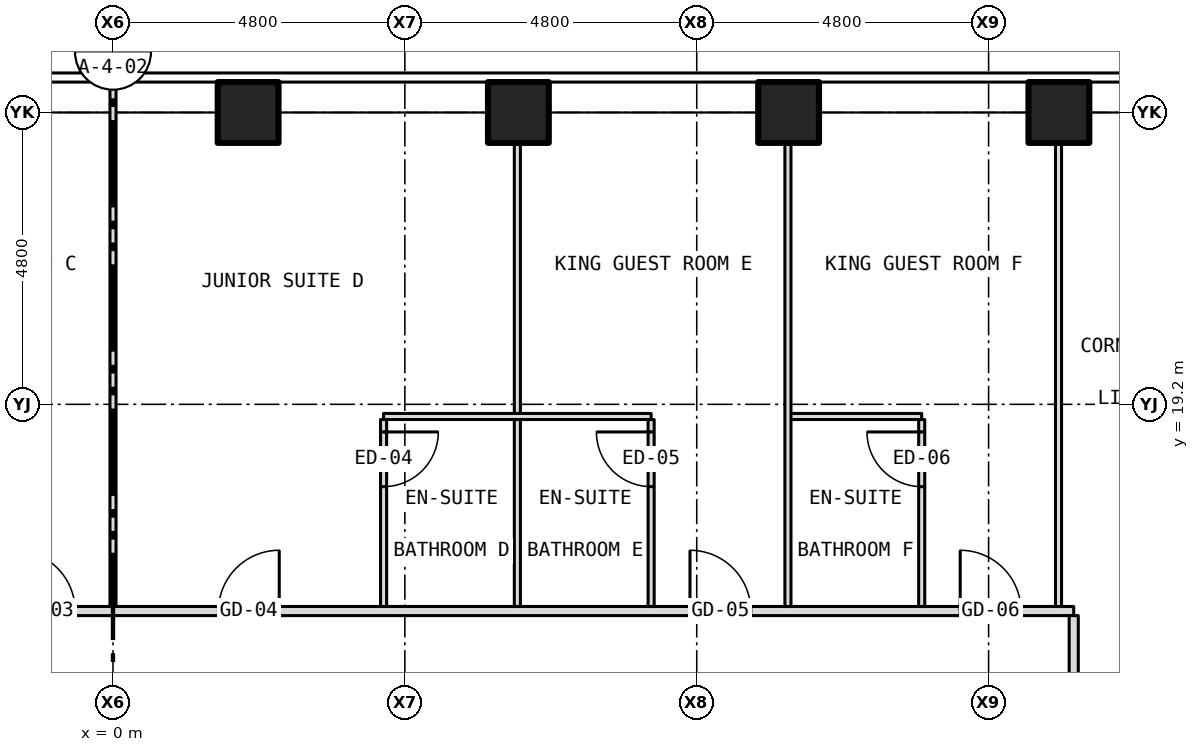
"""IFC4 building model, lengths in metres.
Left out: names, types, materials, properties, quantities, classifications, styles, units other than length and angle.
Written with IfcOpenShell. Run it as: python <this file> out.ifc"""

import sys

from ifc_helpers import new_model, si_unit, direction, frame, frame_2d, origin, origin_2d, place, context, subcontext, project, spatial, rectangle, hollow_rectangle, extrude, element, fill, save


model = new_model("IFC4")
c1 = context("Model", 3, precision=1e-05, world=origin(), true_north=direction((0.0, 1.0)))
c2 = subcontext(c1, "Body", "Model", "MODEL_VIEW")
j1 = project(units=[si_unit("LENGTHUNIT", "METRE"), si_unit("PLANEANGLEUNIT", "RADIAN")], contexts=[c1])
p1 = place(None, origin())
s1 = spatial("IfcSite", under=j1, at=p1, CompositionType="ELEMENT")
p2 = place(p1, origin())
s2 = spatial("IfcBuilding", under=s1, at=p2, CompositionType="ELEMENT")
p3 = place(p2, frame((0.0, 0.0, 56.5)))
s3 = spatial("IfcBuildingStorey", under=s2, at=p3, CompositionType="ELEMENT", Elevation=56.5)
for number, where, z_axis, x_axis in (
    (1, (2.222, 24.0, -0.15), (0.0, 0.0, 1.0), (1.0, 0.0, 0.0)),
    (2, (6.667, 24.0, -0.15), (0.0, 0.0, 1.0), (1.0, 0.0, 0.0)),
    (3, (11.111, 24.0, -0.15), (0.0, 0.0, 1.0), (1.0, 0.0, 0.0)),
    (4, (15.556, 24.0, -0.15), (0.0, 0.0, 1.0), (1.0, 0.0, 0.0)),
):
    element("IfcColumn", number, at=place(p3, frame(where, z_axis=z_axis, x_axis=x_axis)), inside=s3, PredefinedType="COLUMN", context=c2, shape_type="SweptSolid", body=[
        extrude(hollow_rectangle(XDim=1.0, YDim=1.0, WallThickness=0.06, at=origin_2d()), origin(), (0.0, 0.0, 1.0), 3.5),
    ])
p4 = place(p3, frame((-15.8, 15.8, 0.0), z_axis=(0.0, 0.0, 1.0), x_axis=(1.0, 0.0, 0.0)))
e5 = element("IfcWall", 5, at=p4, inside=s3, PredefinedType="PARTITIONING", context=c2, shape_type="SweptSolid", body=[
    extrude(rectangle(XDim=31.6, YDim=0.15, at=frame_2d((15.8, 0.0))), origin(), (0.0, 0.0, 1.0), 3.35),
])
p5 = place(p4, frame((4.178, 0.0, 0.0)))
e6 = element("IfcOpeningElement", 6, at=p5, cuts=e5, PredefinedType="OPENING", context=c2, shape_type="SweptSolid", body=[
    extrude(rectangle(XDim=1.0, YDim=2.1, at=frame_2d((0.5, 1.05))), frame((0.0, 0.087, 0.0), z_axis=(0.0, -1.0, 0.0), x_axis=(1.0, 0.0, 0.0)), (0.0, 0.0, 1.0), 0.174),
])
p6 = place(p4, frame((9.734, 0.0, 0.0)))
e7 = element("IfcOpeningElement", 7, at=p6, cuts=e5, PredefinedType="OPENING", context=c2, shape_type="SweptSolid", body=[
    extrude(rectangle(XDim=1.0, YDim=2.1, at=frame_2d((0.5, 1.05))), frame((0.0, 0.087, 0.0), z_axis=(0.0, -1.0, 0.0), x_axis=(1.0, 0.0, 0.0)), (0.0, 0.0, 1.0), 0.174),
])
p7 = place(p4, frame((14.178, 0.0, 0.0)))
e8 = element("IfcOpeningElement", 8, at=p7, cuts=e5, PredefinedType="OPENING", context=c2, shape_type="SweptSolid", body=[
    extrude(rectangle(XDim=1.0, YDim=2.1, at=frame_2d((0.5, 1.05))), frame((0.0, 0.087, 0.0), z_axis=(0.0, -1.0, 0.0), x_axis=(1.0, 0.0, 0.0)), (0.0, 0.0, 1.0), 0.174),
])
p8 = place(p4, frame((17.534, 0.0, 0.0)))
e9 = element("IfcOpeningElement", 9, at=p8, cuts=e5, PredefinedType="OPENING", context=c2, shape_type="SweptSolid", body=[
    extrude(rectangle(XDim=1.0, YDim=2.1, at=frame_2d((0.5, 1.05))), frame((0.0, 0.087, 0.0), z_axis=(0.0, -1.0, 0.0), x_axis=(1.0, 0.0, 0.0)), (0.0, 0.0, 1.0), 0.174),
])
p9 = place(p4, frame((25.289, 0.0, 0.0)))
e10 = element("IfcOpeningElement", 10, at=p9, cuts=e5, PredefinedType="OPENING", context=c2, shape_type="SweptSolid", body=[
    extrude(rectangle(XDim=1.0, YDim=2.1, at=frame_2d((0.5, 1.05))), frame((0.0, 0.087, 0.0), z_axis=(0.0, -1.0, 0.0), x_axis=(1.0, 0.0, 0.0)), (0.0, 0.0, 1.0), 0.174),
])
p10 = place(p4, frame((29.733, 0.0, 0.0)))
e11 = element("IfcOpeningElement", 11, at=p10, cuts=e5, PredefinedType="OPENING", context=c2, shape_type="SweptSolid", body=[
    extrude(rectangle(XDim=1.0, YDim=2.1, at=frame_2d((0.5, 1.05))), frame((0.0, 0.087, 0.0), z_axis=(0.0, -1.0, 0.0), x_axis=(1.0, 0.0, 0.0)), (0.0, 0.0, 1.0), 0.174),
])
p11 = place(p3, frame((4.45, 19.0, 0.0), z_axis=(0.0, 0.0, 1.0), x_axis=(1.0, 0.0, 0.0)))
e12 = element("IfcWall", 12, at=p11, inside=s3, PredefinedType="PARTITIONING", context=c2, shape_type="SweptSolid", body=[
    extrude(rectangle(XDim=4.4, YDim=0.1, at=frame_2d((2.2, 0.0))), origin(), (0.0, 0.0, 1.0), 3.35),
])
p12 = place(p3, frame((11.1, 19.0, 0.0), z_axis=(0.0, 0.0, 1.0), x_axis=(1.0, 0.0, 0.0)))
e13 = element("IfcWall", 13, at=p12, inside=s3, PredefinedType="PARTITIONING", context=c2, shape_type="SweptSolid", body=[
    extrude(rectangle(XDim=2.2, YDim=0.1, at=frame_2d((1.1, 0.0))), origin(), (0.0, 0.0, 1.0), 3.35),
])
p13 = place(p3, frame((0.0, 15.875, 0.0), z_axis=(0.0, 0.0, 1.0), x_axis=(0.0, 1.0, 0.0)))
e14 = element("IfcWall", 14, at=p13, inside=s3, PredefinedType="PARTITIONING", context=c2, shape_type="SweptSolid", body=[
    extrude(rectangle(XDim=8.655, YDim=0.1, at=frame_2d((4.328, 0.0))), origin(), (0.0, 0.0, 1.0), 2.728),
])
p14 = place(p3, frame((4.45, 15.875, 0.0), z_axis=(0.0, 0.0, 1.0), x_axis=(0.0, 1.0, 0.0)))
e15 = element("IfcWall", 15, at=p14, inside=s3, PredefinedType="PARTITIONING", context=c2, shape_type="SweptSolid", body=[
    extrude(rectangle(XDim=3.075, YDim=0.1, at=frame_2d((1.538, 0.0))), origin(), (0.0, 0.0, 1.0), 3.35),
])
p15 = place(p14, frame((1.971, 0.0, 0.0)))
e16 = element("IfcOpeningElement", 16, at=p15, cuts=e15, PredefinedType="OPENING", context=c2, shape_type="SweptSolid", body=[
    extrude(rectangle(XDim=0.9, YDim=2.1, at=frame_2d((0.45, 1.05))), frame((0.0, 0.062, 0.0), z_axis=(0.0, -1.0, 0.0), x_axis=(1.0, 0.0, 0.0)), (0.0, 0.0, 1.0), 0.124),
])
p16 = place(p3, frame((6.65, 15.875, 0.0), z_axis=(0.0, 0.0, 1.0), x_axis=(0.0, 1.0, 0.0)))
e17 = element("IfcWall", 17, at=p16, inside=s3, PredefinedType="PARTITIONING", context=c2, shape_type="SweptSolid", body=[
    extrude(rectangle(XDim=3.075, YDim=0.1, at=frame_2d((1.538, 0.0))), origin(), (0.0, 0.0, 1.0), 3.35),
])
p17 = place(p3, frame((6.65, 19.05, 0.0), z_axis=(0.0, 0.0, 1.0), x_axis=(0.0, 1.0, 0.0)))
e18 = element("IfcWall", 18, at=p17, inside=s3, PredefinedType="PARTITIONING", context=c2, shape_type="SweptSolid", body=[
    extrude(rectangle(XDim=4.83, YDim=0.1, at=frame_2d((2.415, 0.0))), origin(), (0.0, 0.0, 1.0), 3.35),
])
p18 = place(p3, frame((8.85, 15.875, 0.0), z_axis=(0.0, 0.0, 1.0), x_axis=(0.0, 1.0, 0.0)))
e19 = element("IfcWall", 19, at=p18, inside=s3, PredefinedType="PARTITIONING", context=c2, shape_type="SweptSolid", body=[
    extrude(rectangle(XDim=3.075, YDim=0.1, at=frame_2d((1.538, 0.0))), origin(), (0.0, 0.0, 1.0), 3.35),
])
p19 = place(p18, frame((1.971, 0.0, 0.0)))
e20 = element("IfcOpeningElement", 20, at=p19, cuts=e19, PredefinedType="OPENING", context=c2, shape_type="SweptSolid", body=[
    extrude(rectangle(XDim=0.9, YDim=2.1, at=frame_2d((0.45, 1.05))), frame((0.0, 0.062, 0.0), z_axis=(0.0, -1.0, 0.0), x_axis=(1.0, 0.0, 0.0)), (0.0, 0.0, 1.0), 0.124),
])
p20 = place(p3, frame((11.1, 15.875, 0.0), z_axis=(0.0, 0.0, 1.0), x_axis=(0.0, 1.0, 0.0)))
e21 = element("IfcWall", 21, at=p20, inside=s3, PredefinedType="PARTITIONING", context=c2, shape_type="SweptSolid", body=[
    extrude(rectangle(XDim=8.005, YDim=0.1, at=frame_2d((4.002, 0.0))), origin(), (0.0, 0.0, 1.0), 3.35),
])
p21 = place(p3, frame((13.3, 15.875, 0.0), z_axis=(0.0, 0.0, 1.0), x_axis=(0.0, 1.0, 0.0)))
e22 = element("IfcWall", 22, at=p21, inside=s3, PredefinedType="PARTITIONING", context=c2, shape_type="SweptSolid", body=[
    extrude(rectangle(XDim=3.075, YDim=0.1, at=frame_2d((1.538, 0.0))), origin(), (0.0, 0.0, 1.0), 3.35),
])
p22 = place(p21, frame((1.971, 0.0, 0.0)))
e23 = element("IfcOpeningElement", 23, at=p22, cuts=e22, PredefinedType="OPENING", context=c2, shape_type="SweptSolid", body=[
    extrude(rectangle(XDim=0.9, YDim=2.1, at=frame_2d((0.45, 1.05))), frame((0.0, 0.062, 0.0), z_axis=(0.0, -1.0, 0.0), x_axis=(1.0, 0.0, 0.0)), (0.0, 0.0, 1.0), 0.124),
])
p23 = place(p3, frame((15.55, 15.875, 0.0), z_axis=(0.0, 0.0, 1.0), x_axis=(0.0, 1.0, 0.0)))
e24 = element("IfcWall", 24, at=p23, inside=s3, PredefinedType="PARTITIONING", context=c2, shape_type="SweptSolid", body=[
    extrude(rectangle(XDim=8.005, YDim=0.1, at=frame_2d((4.002, 0.0))), origin(), (0.0, 0.0, 1.0), 3.35),
])
p24 = place(p3, frame((15.8, 10.92, 0.0), z_axis=(0.0, 0.0, 1.0), x_axis=(0.0, 1.0, 0.0)))
e25 = element("IfcWall", 25, at=p24, inside=s3, PredefinedType="PARTITIONING", context=c2, shape_type="SweptSolid", body=[
    extrude(rectangle(XDim=4.805, YDim=0.15, at=frame_2d((2.403, 0.0))), origin(), (0.0, 0.0, 1.0), 3.35),
])
p25 = place(p24, frame((0.78, 0.0, 0.0)))
e26 = element("IfcOpeningElement", 26, at=p25, cuts=e25, PredefinedType="OPENING", context=c2, shape_type="SweptSolid", body=[
    extrude(rectangle(XDim=1.0, YDim=2.1, at=frame_2d((0.5, 1.05))), frame((0.0, 0.087, 0.0), z_axis=(0.0, -1.0, 0.0), x_axis=(1.0, 0.0, 0.0)), (0.0, 0.0, 1.0), 0.174),
])
p26 = place(p7, origin())
e27 = element("IfcDoor", 27, at=p26, inside=s3, OperationType="SINGLE_SWING_LEFT", PredefinedType="DOOR", context=c2, shape_type="SweptSolid", body=[
    extrude(rectangle(XDim=1.0, YDim=2.1, at=frame_2d((0.5, 1.05))), frame((0.0, 0.025, 0.0), z_axis=(0.0, -1.0, 0.0), x_axis=(1.0, 0.0, 0.0)), (0.0, 0.0, 1.0), 0.05),
])
fill(e8, e27)
p27 = place(p8, origin())
e28 = element("IfcDoor", 28, at=p27, inside=s3, OperationType="SINGLE_SWING_RIGHT", PredefinedType="DOOR", context=c2, shape_type="SweptSolid", body=[
    extrude(rectangle(XDim=1.0, YDim=2.1, at=frame_2d((0.5, 1.05))), frame((0.0, 0.025, 0.0), z_axis=(0.0, -1.0, 0.0), x_axis=(1.0, 0.0, 0.0)), (0.0, 0.0, 1.0), 0.05),
])
fill(e9, e28)
p28 = place(p15, origin())
e29 = element("IfcDoor", 29, at=p28, inside=s3, OperationType="SINGLE_SWING_RIGHT", PredefinedType="DOOR", context=c2, shape_type="SweptSolid", body=[
    extrude(rectangle(XDim=0.9, YDim=2.1, at=frame_2d((0.45, 1.05))), frame((0.0, 0.025, 0.0), z_axis=(0.0, -1.0, 0.0), x_axis=(1.0, 0.0, 0.0)), (0.0, 0.0, 1.0), 0.05),
])
fill(e16, e29)
p29 = place(p9, origin())
e30 = element("IfcDoor", 30, at=p29, inside=s3, OperationType="SINGLE_SWING_LEFT", PredefinedType="DOOR", context=c2, shape_type="SweptSolid", body=[
    extrude(rectangle(XDim=1.0, YDim=2.1, at=frame_2d((0.5, 1.05))), frame((0.0, 0.025, 0.0), z_axis=(0.0, -1.0, 0.0), x_axis=(1.0, 0.0, 0.0)), (0.0, 0.0, 1.0), 0.05),
])
fill(e10, e30)
p30 = place(p19, origin())
e31 = element("IfcDoor", 31, at=p30, inside=s3, OperationType="SINGLE_SWING_RIGHT", PredefinedType="DOOR", context=c2, shape_type="SweptSolid", body=[
    extrude(rectangle(XDim=0.9, YDim=2.1, at=frame_2d((0.45, 1.05))), frame((0.0, 0.025, 0.0), z_axis=(0.0, -1.0, 0.0), x_axis=(1.0, 0.0, 0.0)), (0.0, 0.0, 1.0), 0.05),
])
fill(e20, e31)
p31 = place(p10, origin())
e32 = element("IfcDoor", 32, at=p31, inside=s3, OperationType="SINGLE_SWING_LEFT", PredefinedType="DOOR", context=c2, shape_type="SweptSolid", body=[
    extrude(rectangle(XDim=1.0, YDim=2.1, at=frame_2d((0.5, 1.05))), frame((0.0, 0.025, 0.0), z_axis=(0.0, -1.0, 0.0), x_axis=(1.0, 0.0, 0.0)), (0.0, 0.0, 1.0), 0.05),
])
fill(e11, e32)
p32 = place(p22, origin())
e33 = element("IfcDoor", 33, at=p32, inside=s3, OperationType="SINGLE_SWING_RIGHT", PredefinedType="DOOR", context=c2, shape_type="SweptSolid", body=[
    extrude(rectangle(XDim=0.9, YDim=2.1, at=frame_2d((0.45, 1.05))), frame((0.0, 0.025, 0.0), z_axis=(0.0, -1.0, 0.0), x_axis=(1.0, 0.0, 0.0)), (0.0, 0.0, 1.0), 0.05),
])
fill(e23, e33)
save(model, sys.argv[1])
